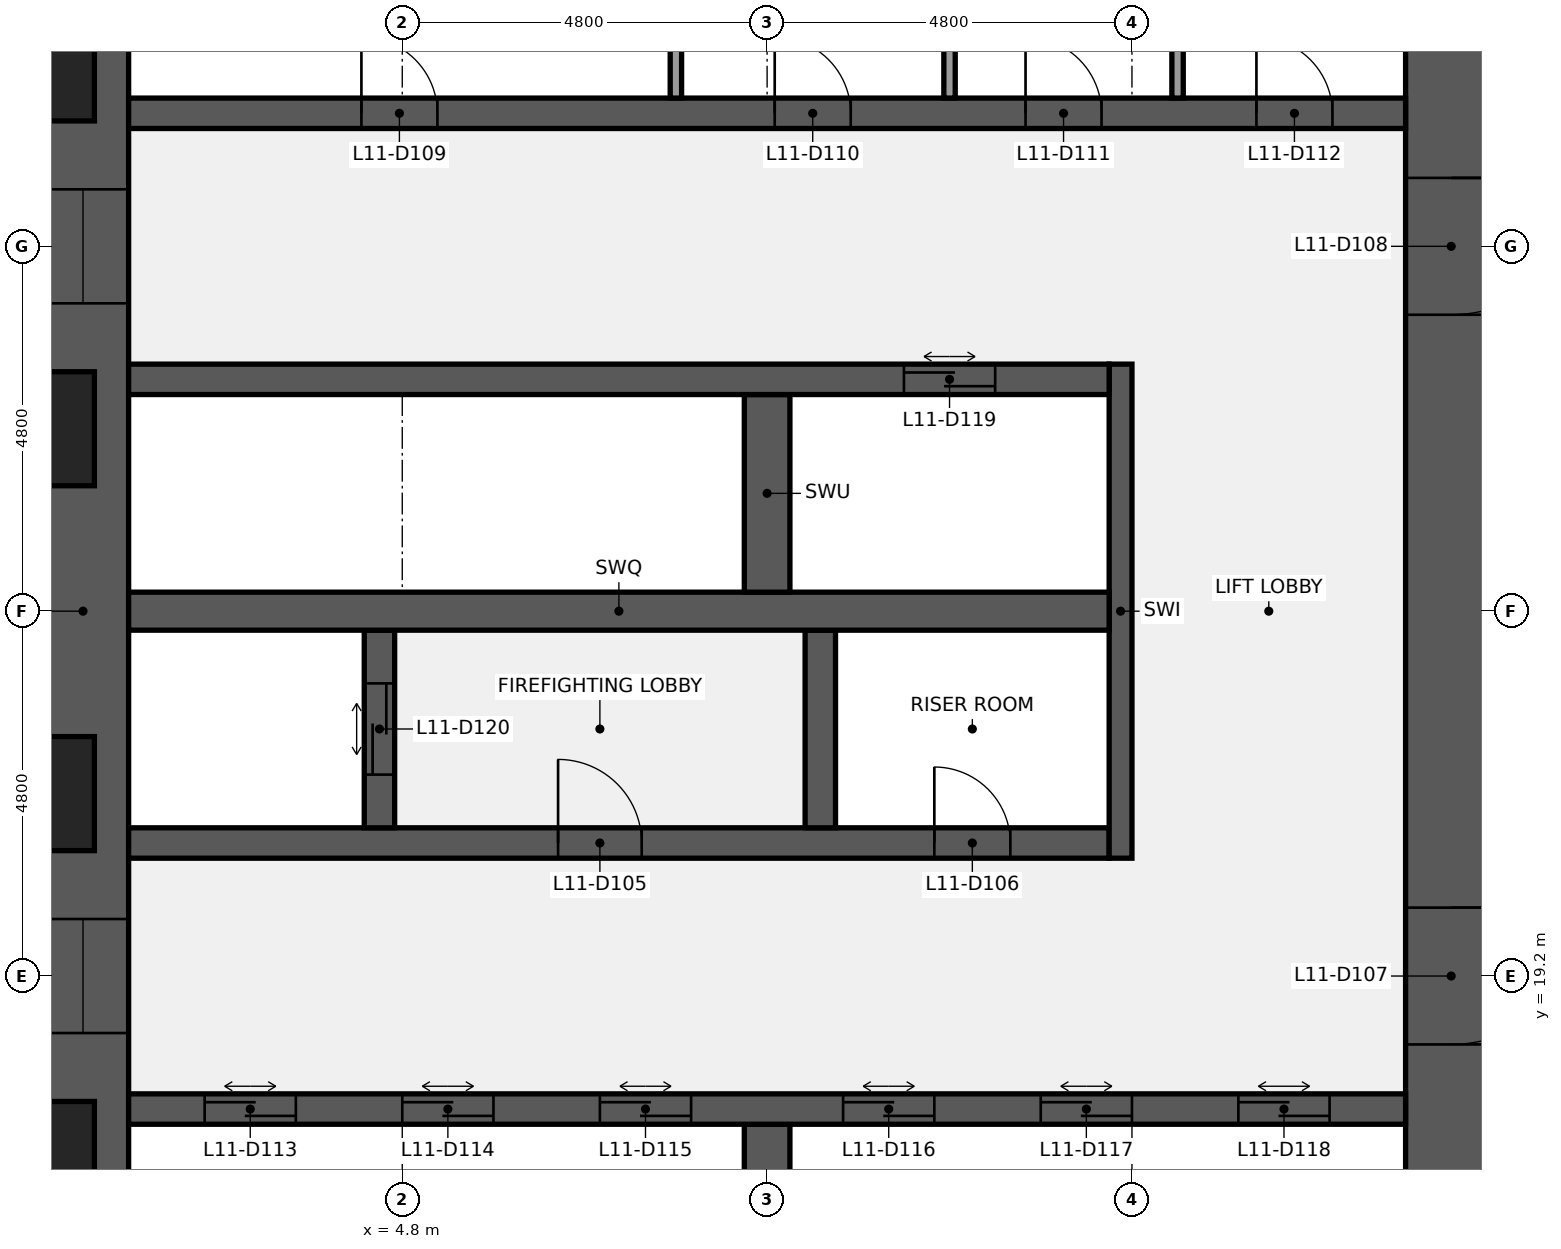
"""IFC4 building model, lengths in metres.
Left out: names, types, materials, properties, quantities, classifications, styles, units other than length and angle.
Written with IfcOpenShell. Run it as: python <this file> out.ifc"""

import sys

from ifc_helpers import new_model, si_unit, direction, frame, frame_2d, origin, place, context, subcontext, project, spatial, rectangle, extrude, element, fill, save


model = new_model("IFC4")
c1 = context("Model", 3, precision=1e-05, world=origin(), true_north=direction((0.0, 1.0)))
c2 = subcontext(c1, "Body", "Model", "MODEL_VIEW")
j1 = project(units=[si_unit("LENGTHUNIT", "METRE"), si_unit("PLANEANGLEUNIT", "RADIAN")], contexts=[c1])
p1 = place(None, origin())
s1 = spatial("IfcSite", under=j1, at=p1, CompositionType="ELEMENT")
p2 = place(p1, origin())
s2 = spatial("IfcBuilding", under=s1, at=p2, CompositionType="ELEMENT")
p3 = place(p2, frame((0.0, 0.0, 55.0)))
s3 = spatial("IfcBuildingStorey", under=s2, at=p3, CompositionType="ELEMENT", Elevation=55.0)
p4 = place(p3, frame((0.6, 9.6, 0.0), z_axis=(0.0, 0.0, 1.0), x_axis=(0.0, 1.0, 0.0)))
e1 = element("IfcWall", 1, at=p4, inside=s3, PredefinedType="SHEAR", context=c2, shape_type="SweptSolid", body=[
    extrude(rectangle(XDim=28.8, YDim=1.2, at=frame_2d((14.4, 0.0))), origin(), (0.0, 0.0, 1.0), 3.84),
])
p5 = place(p4, frame((8.85, 0.0, 0.9)))
e2 = element("IfcOpeningElement", 2, at=p5, cuts=e1, PredefinedType="OPENING", context=c2, shape_type="SweptSolid", body=[
    extrude(rectangle(XDim=1.5, YDim=1.5, at=frame_2d((0.75, 0.75))), frame((0.0, 0.61, 0.0), z_axis=(0.0, -1.0, 0.0), x_axis=(1.0, 0.0, 0.0)), (0.0, 0.0, 1.0), 1.22),
])
p6 = place(p4, frame((18.45, 0.0, 0.9)))
e3 = element("IfcOpeningElement", 3, at=p6, cuts=e1, PredefinedType="OPENING", context=c2, shape_type="SweptSolid", body=[
    extrude(rectangle(XDim=1.5, YDim=1.5, at=frame_2d((0.75, 0.75))), frame((0.0, 0.61, 0.0), z_axis=(0.0, -1.0, 0.0), x_axis=(1.0, 0.0, 0.0)), (0.0, 0.0, 1.0), 1.22),
])
p7 = place(p3, frame((18.6, 38.4, 0.0), z_axis=(0.0, 0.0, 1.0), x_axis=(0.0, -1.0, 0.0)))
e4 = element("IfcWall", 4, at=p7, inside=s3, PredefinedType="SHEAR", context=c2, shape_type="SweptSolid", body=[
    extrude(rectangle(XDim=28.8, YDim=1.2, at=frame_2d((14.4, 0.0))), origin(), (0.0, 0.0, 1.0), 3.84),
])
p8 = place(p7, frame((18.3, 0.0, 0.0)))
e5 = element("IfcOpeningElement", 5, at=p8, cuts=e4, PredefinedType="OPENING", context=c2, shape_type="SweptSolid", body=[
    extrude(rectangle(XDim=1.8, YDim=2.1, at=frame_2d((0.9, 1.05))), frame((0.0, 0.61, 0.0), z_axis=(0.0, -1.0, 0.0), x_axis=(1.0, 0.0, 0.0)), (0.0, 0.0, 1.0), 1.22),
])
p9 = place(p7, frame((8.7, 0.0, 0.0)))
e6 = element("IfcOpeningElement", 6, at=p9, cuts=e4, PredefinedType="OPENING", context=c2, shape_type="SweptSolid", body=[
    extrude(rectangle(XDim=1.8, YDim=2.1, at=frame_2d((0.9, 1.05))), frame((0.0, 0.61, 0.0), z_axis=(0.0, -1.0, 0.0), x_axis=(1.0, 0.0, 0.0)), (0.0, 0.0, 1.0), 1.22),
])
p10 = place(p3, frame((9.6, 14.65, 0.0), z_axis=(0.0, 0.0, 1.0), x_axis=(0.0, 1.0, 0.0)))
e7 = element("IfcWall", 7, at=p10, inside=s3, PredefinedType="SHEAR", context=c2, shape_type="SweptSolid", body=[
    extrude(rectangle(XDim=2.6, YDim=0.6, at=frame_2d((1.3, 0.0))), origin(), (0.0, 0.0, 1.0), 3.84),
])
p11 = place(p3, frame((1.2, 17.45, 0.0), z_axis=(0.0, 0.0, 1.0), x_axis=(1.0, 0.0, 0.0)))
e8 = element("IfcWall", 8, at=p11, inside=s3, PredefinedType="SHEAR", context=c2, shape_type="SweptSolid", body=[
    extrude(rectangle(XDim=16.8, YDim=0.4, at=frame_2d((8.4, 0.0))), origin(), (0.0, 0.0, 1.0), 3.84),
])
p12 = place(p11, frame((1.0, 0.0, 0.0)))
e9 = element("IfcOpeningElement", 9, at=p12, cuts=e8, PredefinedType="OPENING", context=c2, shape_type="SweptSolid", body=[
    extrude(rectangle(XDim=1.2, YDim=2.1, at=frame_2d((0.6, 1.05))), frame((0.0, 0.21, 0.0), z_axis=(0.0, -1.0, 0.0), x_axis=(1.0, 0.0, 0.0)), (0.0, 0.0, 1.0), 0.42),
])
p13 = place(p11, frame((3.6, 0.0, 0.0)))
e10 = element("IfcOpeningElement", 10, at=p13, cuts=e8, PredefinedType="OPENING", context=c2, shape_type="SweptSolid", body=[
    extrude(rectangle(XDim=1.2, YDim=2.1, at=frame_2d((0.6, 1.05))), frame((0.0, 0.21, 0.0), z_axis=(0.0, -1.0, 0.0), x_axis=(1.0, 0.0, 0.0)), (0.0, 0.0, 1.0), 0.42),
])
p14 = place(p11, frame((6.2, 0.0, 0.0)))
e11 = element("IfcOpeningElement", 11, at=p14, cuts=e8, PredefinedType="OPENING", context=c2, shape_type="SweptSolid", body=[
    extrude(rectangle(XDim=1.2, YDim=2.1, at=frame_2d((0.6, 1.05))), frame((0.0, 0.21, 0.0), z_axis=(0.0, -1.0, 0.0), x_axis=(1.0, 0.0, 0.0)), (0.0, 0.0, 1.0), 0.42),
])
p15 = place(p11, frame((9.4, 0.0, 0.0)))
e12 = element("IfcOpeningElement", 12, at=p15, cuts=e8, PredefinedType="OPENING", context=c2, shape_type="SweptSolid", body=[
    extrude(rectangle(XDim=1.2, YDim=2.1, at=frame_2d((0.6, 1.05))), frame((0.0, 0.21, 0.0), z_axis=(0.0, -1.0, 0.0), x_axis=(1.0, 0.0, 0.0)), (0.0, 0.0, 1.0), 0.42),
])
p16 = place(p11, frame((12.0, 0.0, 0.0)))
e13 = element("IfcOpeningElement", 13, at=p16, cuts=e8, PredefinedType="OPENING", context=c2, shape_type="SweptSolid", body=[
    extrude(rectangle(XDim=1.2, YDim=2.1, at=frame_2d((0.6, 1.05))), frame((0.0, 0.21, 0.0), z_axis=(0.0, -1.0, 0.0), x_axis=(1.0, 0.0, 0.0)), (0.0, 0.0, 1.0), 0.42),
])
p17 = place(p11, frame((14.6, 0.0, 0.0)))
e14 = element("IfcOpeningElement", 14, at=p17, cuts=e8, PredefinedType="OPENING", context=c2, shape_type="SweptSolid", body=[
    extrude(rectangle(XDim=1.2, YDim=2.1, at=frame_2d((0.6, 1.05))), frame((0.0, 0.21, 0.0), z_axis=(0.0, -1.0, 0.0), x_axis=(1.0, 0.0, 0.0)), (0.0, 0.0, 1.0), 0.42),
])
p18 = place(p3, frame((1.2, 20.95, 0.0), z_axis=(0.0, 0.0, 1.0), x_axis=(1.0, 0.0, 0.0)))
e15 = element("IfcWall", 15, at=p18, inside=s3, PredefinedType="SHEAR", context=c2, shape_type="SweptSolid", body=[
    extrude(rectangle(XDim=12.9, YDim=0.4, at=frame_2d((6.45, 0.0))), origin(), (0.0, 0.0, 1.0), 3.84),
])
p19 = place(p18, frame((5.65, 0.0, 0.0)))
e16 = element("IfcOpeningElement", 16, at=p19, cuts=e15, PredefinedType="OPENING", context=c2, shape_type="SweptSolid", body=[
    extrude(rectangle(XDim=1.1, YDim=2.1, at=frame_2d((0.55, 1.05))), frame((0.0, 0.21, 0.0), z_axis=(0.0, -1.0, 0.0), x_axis=(1.0, 0.0, 0.0)), (0.0, 0.0, 1.0), 0.42),
])
p20 = place(p18, frame((10.6, 0.0, 0.0)))
e17 = element("IfcOpeningElement", 17, at=p20, cuts=e15, PredefinedType="OPENING", context=c2, shape_type="SweptSolid", body=[
    extrude(rectangle(XDim=1.0, YDim=2.1, at=frame_2d((0.5, 1.05))), frame((0.0, 0.21, 0.0), z_axis=(0.0, -1.0, 0.0), x_axis=(1.0, 0.0, 0.0)), (0.0, 0.0, 1.0), 0.42),
])
p21 = place(p3, frame((14.25, 20.75, 0.0), z_axis=(0.0, 0.0, 1.0), x_axis=(0.0, 1.0, 0.0)))
e18 = element("IfcWall", 18, at=p21, inside=s3, PredefinedType="SHEAR", context=c2, shape_type="SweptSolid", body=[
    extrude(rectangle(XDim=6.5, YDim=0.3, at=frame_2d((3.25, 0.0))), origin(), (0.0, 0.0, 1.0), 3.84),
])
p22 = place(p3, frame((4.5, 21.15, 0.0), z_axis=(0.0, 0.0, 1.0), x_axis=(0.0, 1.0, 0.0)))
e19 = element("IfcWall", 19, at=p22, inside=s3, PredefinedType="SHEAR", context=c2, shape_type="SweptSolid", body=[
    extrude(rectangle(XDim=2.6, YDim=0.4, at=frame_2d((1.3, 0.0))), origin(), (0.0, 0.0, 1.0), 3.84),
])
p23 = place(p22, frame((0.7, 0.0, 0.0)))
e20 = element("IfcOpeningElement", 20, at=p23, cuts=e19, PredefinedType="OPENING", context=c2, shape_type="SweptSolid", body=[
    extrude(rectangle(XDim=1.2, YDim=2.1, at=frame_2d((0.6, 1.05))), frame((0.0, 0.21, 0.0), z_axis=(0.0, -1.0, 0.0), x_axis=(1.0, 0.0, 0.0)), (0.0, 0.0, 1.0), 0.42),
])
p24 = place(p3, frame((10.3, 21.15, 0.0), z_axis=(0.0, 0.0, 1.0), x_axis=(0.0, 1.0, 0.0)))
e21 = element("IfcWall", 21, at=p24, inside=s3, PredefinedType="SHEAR", context=c2, shape_type="SweptSolid", body=[
    extrude(rectangle(XDim=2.6, YDim=0.4, at=frame_2d((1.3, 0.0))), origin(), (0.0, 0.0, 1.0), 3.84),
])
p25 = place(p3, frame((1.2, 24.0, 0.0), z_axis=(0.0, 0.0, 1.0), x_axis=(1.0, 0.0, 0.0)))
e22 = element("IfcWall", 22, at=p25, inside=s3, PredefinedType="SHEAR", context=c2, shape_type="SweptSolid", body=[
    extrude(rectangle(XDim=12.9, YDim=0.5, at=frame_2d((6.45, 0.0))), origin(), (0.0, 0.0, 1.0), 3.84),
])
p26 = place(p3, frame((9.6, 24.25, 0.0), z_axis=(0.0, 0.0, 1.0), x_axis=(0.0, 1.0, 0.0)))
e23 = element("IfcWall", 23, at=p26, inside=s3, PredefinedType="SHEAR", context=c2, shape_type="SweptSolid", body=[
    extrude(rectangle(XDim=2.6, YDim=0.6, at=frame_2d((1.3, 0.0))), origin(), (0.0, 0.0, 1.0), 3.84),
])
p27 = place(p3, frame((1.2, 27.05, 0.0), z_axis=(0.0, 0.0, 1.0), x_axis=(1.0, 0.0, 0.0)))
e24 = element("IfcWall", 24, at=p27, inside=s3, PredefinedType="SHEAR", context=c2, shape_type="SweptSolid", body=[
    extrude(rectangle(XDim=12.9, YDim=0.4, at=frame_2d((6.45, 0.0))), origin(), (0.0, 0.0, 1.0), 3.84),
])
p28 = place(p27, frame((10.2, 0.0, 0.0)))
e25 = element("IfcOpeningElement", 25, at=p28, cuts=e24, PredefinedType="OPENING", context=c2, shape_type="SweptSolid", body=[
    extrude(rectangle(XDim=1.2, YDim=2.1, at=frame_2d((0.6, 1.05))), frame((0.0, 0.21, 0.0), z_axis=(0.0, -1.0, 0.0), x_axis=(1.0, 0.0, 0.0)), (0.0, 0.0, 1.0), 0.42),
])
p29 = place(p3, frame((1.2, 30.55, 0.0), z_axis=(0.0, 0.0, 1.0), x_axis=(1.0, 0.0, 0.0)))
e26 = element("IfcWall", 26, at=p29, inside=s3, PredefinedType="SHEAR", context=c2, shape_type="SweptSolid", body=[
    extrude(rectangle(XDim=16.8, YDim=0.4, at=frame_2d((8.4, 0.0))), origin(), (0.0, 0.0, 1.0), 3.84),
])
p30 = place(p29, frame((3.062, 0.0, 0.0)))
e27 = element("IfcOpeningElement", 27, at=p30, cuts=e26, PredefinedType="OPENING", context=c2, shape_type="SweptSolid", body=[
    extrude(rectangle(XDim=1.0, YDim=2.1, at=frame_2d((0.5, 1.05))), frame((0.0, 0.21, 0.0), z_axis=(0.0, -1.0, 0.0), x_axis=(1.0, 0.0, 0.0)), (0.0, 0.0, 1.0), 0.42),
])
p31 = place(p29, frame((8.5, 0.0, 0.0)))
e28 = element("IfcOpeningElement", 28, at=p31, cuts=e26, PredefinedType="OPENING", context=c2, shape_type="SweptSolid", body=[
    extrude(rectangle(XDim=1.0, YDim=2.1, at=frame_2d((0.5, 1.05))), frame((0.0, 0.21, 0.0), z_axis=(0.0, -1.0, 0.0), x_axis=(1.0, 0.0, 0.0)), (0.0, 0.0, 1.0), 0.42),
])
p32 = place(p29, frame((11.8, 0.0, 0.0)))
e29 = element("IfcOpeningElement", 29, at=p32, cuts=e26, PredefinedType="OPENING", context=c2, shape_type="SweptSolid", body=[
    extrude(rectangle(XDim=1.0, YDim=2.1, at=frame_2d((0.5, 1.05))), frame((0.0, 0.21, 0.0), z_axis=(0.0, -1.0, 0.0), x_axis=(1.0, 0.0, 0.0)), (0.0, 0.0, 1.0), 0.42),
])
p33 = place(p29, frame((14.837, 0.0, 0.0)))
e30 = element("IfcOpeningElement", 30, at=p33, cuts=e26, PredefinedType="OPENING", context=c2, shape_type="SweptSolid", body=[
    extrude(rectangle(XDim=1.0, YDim=2.1, at=frame_2d((0.5, 1.05))), frame((0.0, 0.21, 0.0), z_axis=(0.0, -1.0, 0.0), x_axis=(1.0, 0.0, 0.0)), (0.0, 0.0, 1.0), 0.42),
])
for number, where, z_axis, x_axis in (
    (31, (8.4, 30.75, 0.0), (0.0, 0.0, 1.0), (0.0, 1.0, 0.0)),
    (32, (12.0, 30.75, 0.0), (0.0, 0.0, 1.0), (0.0, 1.0, 0.0)),
    (33, (15.0, 30.75, 0.0), (0.0, 0.0, 1.0), (0.0, 1.0, 0.0)),
):
    element("IfcWall", number, at=place(p3, frame(where, z_axis=z_axis, x_axis=x_axis)), inside=s3, PredefinedType="PARTITIONING", context=c2, shape_type="SweptSolid", body=[
        extrude(rectangle(XDim=2.6, YDim=0.15, at=frame_2d((1.3, 0.0))), origin(), (0.0, 0.0, 1.0), 3.84),
    ])
p34 = place(p19, origin())
e34 = element("IfcDoor", 34, at=p34, inside=s3, OperationType="SINGLE_SWING_LEFT", PredefinedType="DOOR", context=c2, shape_type="SweptSolid", body=[
    extrude(rectangle(XDim=1.1, YDim=2.1, at=frame_2d((0.55, 1.05))), frame((0.0, 0.025, 0.0), z_axis=(0.0, -1.0, 0.0), x_axis=(1.0, 0.0, 0.0)), (0.0, 0.0, 1.0), 0.05),
])
fill(e16, e34)
p35 = place(p20, origin())
e35 = element("IfcDoor", 35, at=p35, inside=s3, OperationType="SINGLE_SWING_LEFT", PredefinedType="DOOR", context=c2, shape_type="SweptSolid", body=[
    extrude(rectangle(XDim=1.0, YDim=2.1, at=frame_2d((0.5, 1.05))), frame((0.0, 0.025, 0.0), z_axis=(0.0, -1.0, 0.0), x_axis=(1.0, 0.0, 0.0)), (0.0, 0.0, 1.0), 0.05),
])
fill(e17, e35)
p36 = place(p8, origin())
e36 = element("IfcDoor", 36, at=p36, inside=s3, OperationType="DOUBLE_DOOR_SINGLE_SWING", PredefinedType="DOOR", context=c2, shape_type="SweptSolid", body=[
    extrude(rectangle(XDim=1.8, YDim=2.1, at=frame_2d((0.9, 1.05))), frame((0.0, 0.025, 0.0), z_axis=(0.0, -1.0, 0.0), x_axis=(1.0, 0.0, 0.0)), (0.0, 0.0, 1.0), 0.05),
])
fill(e5, e36)
p37 = place(p9, origin())
e37 = element("IfcDoor", 37, at=p37, inside=s3, OperationType="DOUBLE_DOOR_SINGLE_SWING", PredefinedType="DOOR", context=c2, shape_type="SweptSolid", body=[
    extrude(rectangle(XDim=1.8, YDim=2.1, at=frame_2d((0.9, 1.05))), frame((0.0, 0.025, 0.0), z_axis=(0.0, -1.0, 0.0), x_axis=(1.0, 0.0, 0.0)), (0.0, 0.0, 1.0), 0.05),
])
fill(e6, e37)
p38 = place(p30, origin())
e38 = element("IfcDoor", 38, at=p38, inside=s3, OperationType="SINGLE_SWING_LEFT", PredefinedType="DOOR", context=c2, shape_type="SweptSolid", body=[
    extrude(rectangle(XDim=1.0, YDim=2.1, at=frame_2d((0.5, 1.05))), frame((0.0, 0.025, 0.0), z_axis=(0.0, -1.0, 0.0), x_axis=(1.0, 0.0, 0.0)), (0.0, 0.0, 1.0), 0.05),
])
fill(e27, e38)
p39 = place(p31, origin())
e39 = element("IfcDoor", 39, at=p39, inside=s3, OperationType="SINGLE_SWING_LEFT", PredefinedType="DOOR", context=c2, shape_type="SweptSolid", body=[
    extrude(rectangle(XDim=1.0, YDim=2.1, at=frame_2d((0.5, 1.05))), frame((0.0, 0.025, 0.0), z_axis=(0.0, -1.0, 0.0), x_axis=(1.0, 0.0, 0.0)), (0.0, 0.0, 1.0), 0.05),
])
fill(e28, e39)
p40 = place(p32, origin())
e40 = element("IfcDoor", 40, at=p40, inside=s3, OperationType="SINGLE_SWING_LEFT", PredefinedType="DOOR", context=c2, shape_type="SweptSolid", body=[
    extrude(rectangle(XDim=1.0, YDim=2.1, at=frame_2d((0.5, 1.05))), frame((0.0, 0.025, 0.0), z_axis=(0.0, -1.0, 0.0), x_axis=(1.0, 0.0, 0.0)), (0.0, 0.0, 1.0), 0.05),
])
fill(e29, e40)
p41 = place(p33, origin())
e41 = element("IfcDoor", 41, at=p41, inside=s3, OperationType="SINGLE_SWING_LEFT", PredefinedType="DOOR", context=c2, shape_type="SweptSolid", body=[
    extrude(rectangle(XDim=1.0, YDim=2.1, at=frame_2d((0.5, 1.05))), frame((0.0, 0.025, 0.0), z_axis=(0.0, -1.0, 0.0), x_axis=(1.0, 0.0, 0.0)), (0.0, 0.0, 1.0), 0.05),
])
fill(e30, e41)
p42 = place(p12, origin())
e42 = element("IfcDoor", 42, at=p42, inside=s3, OperationType="DOUBLE_DOOR_SLIDING", PredefinedType="DOOR", context=c2, shape_type="SweptSolid", body=[
    extrude(rectangle(XDim=1.2, YDim=2.1, at=frame_2d((0.6, 1.05))), frame((0.0, 0.025, 0.0), z_axis=(0.0, -1.0, 0.0), x_axis=(1.0, 0.0, 0.0)), (0.0, 0.0, 1.0), 0.05),
])
fill(e9, e42)
p43 = place(p13, origin())
e43 = element("IfcDoor", 43, at=p43, inside=s3, OperationType="DOUBLE_DOOR_SLIDING", PredefinedType="DOOR", context=c2, shape_type="SweptSolid", body=[
    extrude(rectangle(XDim=1.2, YDim=2.1, at=frame_2d((0.6, 1.05))), frame((0.0, 0.025, 0.0), z_axis=(0.0, -1.0, 0.0), x_axis=(1.0, 0.0, 0.0)), (0.0, 0.0, 1.0), 0.05),
])
fill(e10, e43)
p44 = place(p14, origin())
e44 = element("IfcDoor", 44, at=p44, inside=s3, OperationType="DOUBLE_DOOR_SLIDING", PredefinedType="DOOR", context=c2, shape_type="SweptSolid", body=[
    extrude(rectangle(XDim=1.2, YDim=2.1, at=frame_2d((0.6, 1.05))), frame((0.0, 0.025, 0.0), z_axis=(0.0, -1.0, 0.0), x_axis=(1.0, 0.0, 0.0)), (0.0, 0.0, 1.0), 0.05),
])
fill(e11, e44)
p45 = place(p15, origin())
e45 = element("IfcDoor", 45, at=p45, inside=s3, OperationType="DOUBLE_DOOR_SLIDING", PredefinedType="DOOR", context=c2, shape_type="SweptSolid", body=[
    extrude(rectangle(XDim=1.2, YDim=2.1, at=frame_2d((0.6, 1.05))), frame((0.0, 0.025, 0.0), z_axis=(0.0, -1.0, 0.0), x_axis=(1.0, 0.0, 0.0)), (0.0, 0.0, 1.0), 0.05),
])
fill(e12, e45)
p46 = place(p16, origin())
e46 = element("IfcDoor", 46, at=p46, inside=s3, OperationType="DOUBLE_DOOR_SLIDING", PredefinedType="DOOR", context=c2, shape_type="SweptSolid", body=[
    extrude(rectangle(XDim=1.2, YDim=2.1, at=frame_2d((0.6, 1.05))), frame((0.0, 0.025, 0.0), z_axis=(0.0, -1.0, 0.0), x_axis=(1.0, 0.0, 0.0)), (0.0, 0.0, 1.0), 0.05),
])
fill(e13, e46)
p47 = place(p17, origin())
e47 = element("IfcDoor", 47, at=p47, inside=s3, OperationType="DOUBLE_DOOR_SLIDING", PredefinedType="DOOR", context=c2, shape_type="SweptSolid", body=[
    extrude(rectangle(XDim=1.2, YDim=2.1, at=frame_2d((0.6, 1.05))), frame((0.0, 0.025, 0.0), z_axis=(0.0, -1.0, 0.0), x_axis=(1.0, 0.0, 0.0)), (0.0, 0.0, 1.0), 0.05),
])
fill(e14, e47)
p48 = place(p28, origin())
e48 = element("IfcDoor", 48, at=p48, inside=s3, OperationType="DOUBLE_DOOR_SLIDING", PredefinedType="DOOR", context=c2, shape_type="SweptSolid", body=[
    extrude(rectangle(XDim=1.2, YDim=2.1, at=frame_2d((0.6, 1.05))), frame((0.0, 0.025, 0.0), z_axis=(0.0, -1.0, 0.0), x_axis=(1.0, 0.0, 0.0)), (0.0, 0.0, 1.0), 0.05),
])
fill(e25, e48)
p49 = place(p23, origin())
e49 = element("IfcDoor", 49, at=p49, inside=s3, OperationType="DOUBLE_DOOR_SLIDING", PredefinedType="DOOR", context=c2, shape_type="SweptSolid", body=[
    extrude(rectangle(XDim=1.2, YDim=2.1, at=frame_2d((0.6, 1.05))), frame((0.0, 0.025, 0.0), z_axis=(0.0, -1.0, 0.0), x_axis=(1.0, 0.0, 0.0)), (0.0, 0.0, 1.0), 0.05),
])
fill(e20, e49)
p50 = place(p5, origin())
e50 = element("IfcWindow", 50, at=p50, inside=s3, PartitioningType="SINGLE_PANEL", PredefinedType="WINDOW", context=c2, shape_type="SweptSolid", body=[
    extrude(rectangle(XDim=1.5, YDim=1.5, at=frame_2d((0.75, 0.75))), frame((0.0, 0.03, 0.0), z_axis=(0.0, -1.0, 0.0), x_axis=(1.0, 0.0, 0.0)), (0.0, 0.0, 1.0), 0.06),
])
fill(e2, e50)
p51 = place(p6, origin())
e51 = element("IfcWindow", 51, at=p51, inside=s3, PartitioningType="SINGLE_PANEL", PredefinedType="WINDOW", context=c2, shape_type="SweptSolid", body=[
    extrude(rectangle(XDim=1.5, YDim=1.5, at=frame_2d((0.75, 0.75))), frame((0.0, 0.03, 0.0), z_axis=(0.0, -1.0, 0.0), x_axis=(1.0, 0.0, 0.0)), (0.0, 0.0, 1.0), 0.06),
])
fill(e3, e51)
save(model, sys.argv[1])
